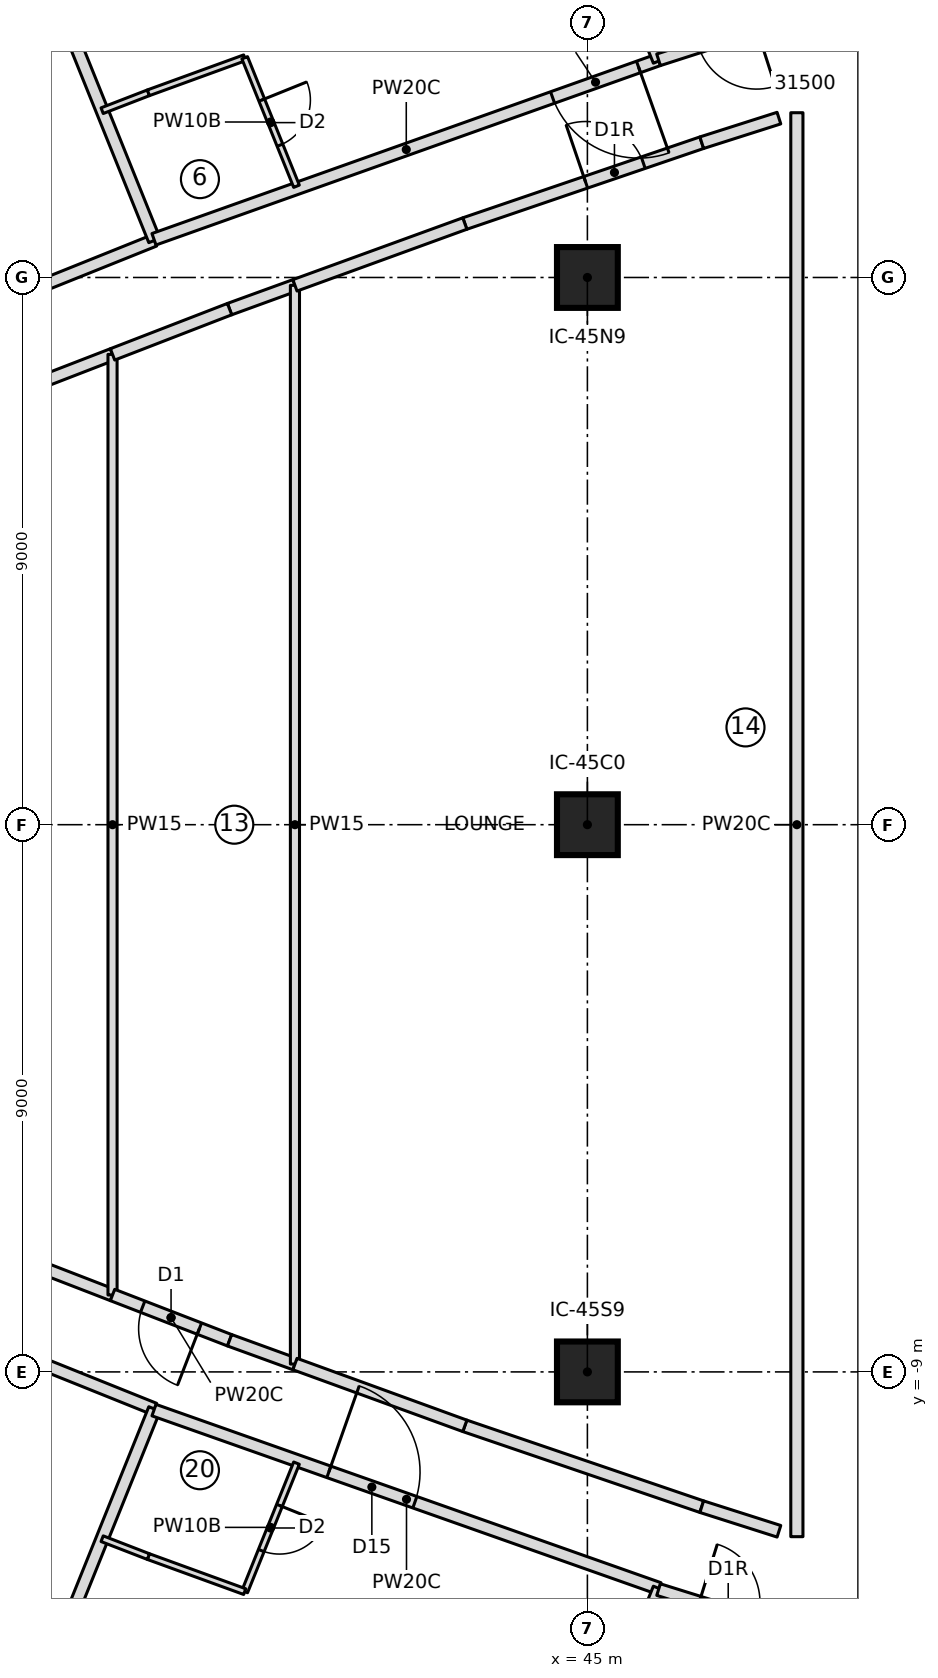
"""IFC4 building model, lengths in metres.
Left out: names, types, materials, properties, quantities, classifications, styles, units other than length and angle.
Written with IfcOpenShell. Run it as: python <this file> out.ifc"""

import sys

from ifc_helpers import new_model, si_unit, direction, frame, frame_2d, origin, origin_2d, place, context, subcontext, project, spatial, rectangle, extrude, element, fill, save


model = new_model("IFC4")
c1 = context("Model", 3, precision=1e-05, world=origin(), true_north=direction((0.0, 1.0)))
c2 = subcontext(c1, "Body", "Model", "MODEL_VIEW")
j1 = project(units=[si_unit("LENGTHUNIT", "METRE"), si_unit("PLANEANGLEUNIT", "RADIAN")], contexts=[c1])
p1 = place(None, origin())
s1 = spatial("IfcSite", under=j1, at=p1, CompositionType="ELEMENT")
p2 = place(p1, origin())
s2 = spatial("IfcBuilding", under=s1, at=p2, CompositionType="ELEMENT")
p3 = place(p2, frame((0.0, 0.0, 193.25)))
s3 = spatial("IfcBuildingStorey", under=s2, at=p3, CompositionType="ELEMENT", Elevation=193.25)
for number, where, z_axis, x_axis in (
    (1, (45.0, -9.0, 0.0), (0.0, 0.0, 1.0), (1.0, 0.0, 0.0)),
    (2, (45.0, 0.0, 0.0), (0.0, 0.0, 1.0), (1.0, 0.0, 0.0)),
    (3, (45.0, 9.0, 0.0), (0.0, 0.0, 1.0), (1.0, 0.0, 0.0)),
):
    element("IfcColumn", number, at=place(p3, frame(where, z_axis=z_axis, x_axis=x_axis)), inside=s3, PredefinedType="COLUMN", context=c2, shape_type="SweptSolid", body=[
        extrude(rectangle(XDim=1.0, YDim=1.0, at=origin_2d()), origin(), (0.0, 0.0, 1.0), 3.55),
    ])
p4 = place(p3, frame((29.714, 6.329, 0.0), z_axis=(0.0, 0.0, 1.0), x_axis=(0.927886226391, 0.372863448026, 0.0)))
e4 = element("IfcWall", 4, at=p4, inside=s3, PredefinedType="PARTITIONING", context=c2, shape_type="SweptSolid", body=[
    extrude(rectangle(XDim=8.8, YDim=0.2, at=frame_2d((4.4, 0.0))), origin(), (0.0, 0.0, 1.0), 3.25),
])
p5 = place(p4, frame((3.25, 0.0, 0.0)))
e5 = element("IfcOpeningElement", 5, at=p5, cuts=e4, PredefinedType="OPENING", context=c2, shape_type="SweptSolid", body=[
    extrude(rectangle(XDim=1.0, YDim=2.1, at=frame_2d((0.5, 1.05))), frame((0.0, 0.11, 0.0), z_axis=(0.0, -1.0, 0.0), x_axis=(1.0, 0.0, 0.0)), (0.0, 0.0, 1.0), 0.22),
])
p6 = place(p3, frame((37.88, 9.61, 0.0), z_axis=(0.0, 0.0, 1.0), x_axis=(-0.373892577014, 0.927472016211, 0.0)))
e6 = element("IfcWall", 6, at=p6, inside=s3, PredefinedType="PARTITIONING", context=c2, shape_type="SweptSolid", body=[
    extrude(rectangle(XDim=7.601, YDim=0.2, at=frame_2d((3.8, 0.0))), origin(), (0.0, 0.0, 1.0), 3.25),
])
p7 = place(p3, frame((46.17, 12.58, 0.0), z_axis=(0.0, 0.0, 1.0), x_axis=(-0.942170738702, -0.335133255786, 0.0)))
e7 = element("IfcWall", 7, at=p7, inside=s3, PredefinedType="PARTITIONING", context=c2, shape_type="SweptSolid", body=[
    extrude(rectangle(XDim=8.807, YDim=0.2, at=frame_2d((4.404, 0.0))), origin(), (0.0, 0.0, 1.0), 3.25),
])
p8 = place(p7, frame((0.35, 0.0, 0.0)))
e8 = element("IfcOpeningElement", 8, at=p8, cuts=e7, PredefinedType="OPENING", context=c2, shape_type="SweptSolid", body=[
    extrude(rectangle(XDim=1.5, YDim=2.1, at=frame_2d((0.75, 1.05))), frame((0.0, 0.11, 0.0), z_axis=(0.0, -1.0, 0.0), x_axis=(1.0, 0.0, 0.0)), (0.0, 0.0, 1.0), 0.22),
])
p9 = place(p3, frame((37.02, 11.743, 0.0), z_axis=(0.0, 0.0, 1.0), x_axis=(0.9326493613, 0.360784102846, 0.0)))
e9 = element("IfcWall", 9, at=p9, inside=s3, PredefinedType="PARTITIONING", context=c2, shape_type="SweptSolid", body=[
    extrude(rectangle(XDim=0.815, YDim=0.1, at=frame_2d((0.408, 0.0))), origin(), (0.0, 0.0, 1.0), 3.25),
])
p10 = place(p3, frame((37.78, 12.037, 0.0), z_axis=(0.0, 0.0, 1.0), x_axis=(0.939759586286, 0.341836101053, 0.0)))
e10 = element("IfcWall", 10, at=p10, inside=s3, PredefinedType="PARTITIONING", context=c2, shape_type="SweptSolid", body=[
    extrude(rectangle(XDim=1.686, YDim=0.1, at=frame_2d((0.843, 0.0))), origin(), (0.0, 0.0, 1.0), 3.25),
])
p11 = place(p3, frame((39.364, 12.614, 0.0), z_axis=(0.0, 0.0, 1.0), x_axis=(0.373883593317, -0.927475637765, 0.0)))
e11 = element("IfcWall", 11, at=p11, inside=s3, PredefinedType="PARTITIONING", context=c2, shape_type="SweptSolid", body=[
    extrude(rectangle(XDim=2.278, YDim=0.1, at=frame_2d((1.139, 0.0))), origin(), (0.0, 0.0, 1.0), 3.25),
])
p12 = place(p11, frame((0.75, 0.0, 0.0)))
e12 = element("IfcOpeningElement", 12, at=p12, cuts=e11, PredefinedType="OPENING", context=c2, shape_type="SweptSolid", body=[
    extrude(rectangle(XDim=0.8, YDim=2.1, at=frame_2d((0.4, 1.05))), frame((0.0, 0.06, 0.0), z_axis=(0.0, -1.0, 0.0), x_axis=(1.0, 0.0, 0.0)), (0.0, 0.0, 1.0), 0.12),
])
p13 = place(p3, frame((46.178, 12.562, 0.0), z_axis=(0.0, 0.0, 1.0), x_axis=(-0.373905590149, 0.927466770108, 0.0)))
e13 = element("IfcWall", 13, at=p13, inside=s3, PredefinedType="PARTITIONING", context=c2, shape_type="SweptSolid", body=[
    extrude(rectangle(XDim=7.611, YDim=0.2, at=frame_2d((3.806, 0.0))), origin(), (0.0, 0.0, 1.0), 3.25),
])
p14 = place(p3, frame((29.714, -6.329, 0.0), z_axis=(0.0, 0.0, 1.0), x_axis=(0.927886226391, -0.372863448026, 0.0)))
e14 = element("IfcWall", 14, at=p14, inside=s3, PredefinedType="PARTITIONING", context=c2, shape_type="SweptSolid", body=[
    extrude(rectangle(XDim=8.8, YDim=0.2, at=frame_2d((4.4, 0.0))), origin(), (0.0, 0.0, 1.0), 3.25),
])
p15 = place(p14, frame((3.25, 0.0, 0.0)))
e15 = element("IfcOpeningElement", 15, at=p15, cuts=e14, PredefinedType="OPENING", context=c2, shape_type="SweptSolid", body=[
    extrude(rectangle(XDim=1.0, YDim=2.1, at=frame_2d((0.5, 1.05))), frame((0.0, 0.11, 0.0), z_axis=(0.0, -1.0, 0.0), x_axis=(1.0, 0.0, 0.0)), (0.0, 0.0, 1.0), 0.22),
])
p16 = place(p3, frame((35.038, -16.659, 0.0), z_axis=(0.0, 0.0, 1.0), x_axis=(0.373892577014, 0.927472016211, 0.0)))
e16 = element("IfcWall", 16, at=p16, inside=s3, PredefinedType="PARTITIONING", context=c2, shape_type="SweptSolid", body=[
    extrude(rectangle(XDim=7.601, YDim=0.2, at=frame_2d((3.8, 0.0))), origin(), (0.0, 0.0, 1.0), 3.25),
])
p17 = place(p3, frame((37.872, -9.628, 0.0), z_axis=(0.0, 0.0, 1.0), x_axis=(0.9429299378, -0.332991189675, 0.0)))
e17 = element("IfcWall", 17, at=p17, inside=s3, PredefinedType="PARTITIONING", context=c2, shape_type="SweptSolid", body=[
    extrude(rectangle(XDim=8.808, YDim=0.2, at=frame_2d((4.404, 0.0))), origin(), (0.0, 0.0, 1.0), 3.25),
])
p18 = place(p17, frame((3.05, 0.0, 0.0)))
e18 = element("IfcOpeningElement", 18, at=p18, cuts=e17, PredefinedType="OPENING", context=c2, shape_type="SweptSolid", body=[
    extrude(rectangle(XDim=1.5, YDim=2.1, at=frame_2d((0.75, 1.05))), frame((0.0, 0.11, 0.0), z_axis=(0.0, -1.0, 0.0), x_axis=(1.0, 0.0, 0.0)), (0.0, 0.0, 1.0), 0.22),
])
p19 = place(p3, frame((40.216, -10.5, 0.0), z_axis=(0.0, 0.0, 1.0), x_axis=(-0.373883593317, -0.927475637765, 0.0)))
e19 = element("IfcWall", 19, at=p19, inside=s3, PredefinedType="PARTITIONING", context=c2, shape_type="SweptSolid", body=[
    extrude(rectangle(XDim=2.278, YDim=0.1, at=frame_2d((1.139, 0.0))), origin(), (0.0, 0.0, 1.0), 3.25),
])
p20 = place(p19, frame((0.75, 0.0, 0.0)))
e20 = element("IfcOpeningElement", 20, at=p20, cuts=e19, PredefinedType="OPENING", context=c2, shape_type="SweptSolid", body=[
    extrude(rectangle(XDim=0.8, YDim=2.1, at=frame_2d((0.4, 1.05))), frame((0.0, 0.06, 0.0), z_axis=(0.0, -1.0, 0.0), x_axis=(1.0, 0.0, 0.0)), (0.0, 0.0, 1.0), 0.12),
])
p21 = place(p3, frame((39.364, -12.614, 0.0), z_axis=(0.0, 0.0, 1.0), x_axis=(-0.939759586286, 0.341836101053, 0.0)))
e21 = element("IfcWall", 21, at=p21, inside=s3, PredefinedType="PARTITIONING", context=c2, shape_type="SweptSolid", body=[
    extrude(rectangle(XDim=1.686, YDim=0.1, at=frame_2d((0.843, 0.0))), origin(), (0.0, 0.0, 1.0), 3.25),
])
p22 = place(p3, frame((37.78, -12.037, 0.0), z_axis=(0.0, 0.0, 1.0), x_axis=(-0.9326493613, 0.360784102846, 0.0)))
e22 = element("IfcWall", 22, at=p22, inside=s3, PredefinedType="PARTITIONING", context=c2, shape_type="SweptSolid", body=[
    extrude(rectangle(XDim=0.815, YDim=0.1, at=frame_2d((0.408, 0.0))), origin(), (0.0, 0.0, 1.0), 3.25),
])
p23 = place(p3, frame((43.332, -19.621, 0.0), z_axis=(0.0, 0.0, 1.0), x_axis=(0.373905590149, 0.927466770108, 0.0)))
e23 = element("IfcWall", 23, at=p23, inside=s3, PredefinedType="PARTITIONING", context=c2, shape_type="SweptSolid", body=[
    extrude(rectangle(XDim=7.611, YDim=0.2, at=frame_2d((3.806, 0.0))), origin(), (0.0, 0.0, 1.0), 3.25),
])
for number, where, z_axis, x_axis in (
    (24, (35.276, 6.994, 0.0), (0.0, 0.0, 1.0), (0.933, 0.361, 0.0)),
    (25, (37.19, -7.735, 0.0), (0.0, 0.0, 1.0), (-0.933, 0.361, 0.0)),
):
    element("IfcWall", number, at=place(p3, frame(where, z_axis=z_axis, x_axis=x_axis)), inside=s3, PredefinedType="PARTITIONING", context=c2, shape_type="SweptSolid", body=[
        extrude(rectangle(XDim=2.053, YDim=0.2, at=frame_2d((1.026, 0.0))), origin(), (0.0, 0.0, 1.0), 3.25),
    ])
p24 = place(p3, frame((37.19, -7.735, 0.0), z_axis=(0.0, 0.0, 1.0), x_axis=(0.0, 1.0, 0.0)))
e26 = element("IfcWall", 26, at=p24, inside=s3, PredefinedType="PARTITIONING", context=c2, shape_type="SweptSolid", body=[
    extrude(rectangle(XDim=15.47, YDim=0.15, at=frame_2d((7.735, 0.0))), origin(), (0.0, 0.0, 1.0), 3.25),
])
p25 = place(p3, frame((39.115, -8.479, 0.0), z_axis=(0.0, 0.0, 1.0), x_axis=(-0.9326579855, 0.360761807961, 0.0)))
e27 = element("IfcWall", 27, at=p25, inside=s3, PredefinedType="PARTITIONING", context=c2, shape_type="SweptSolid", body=[
    extrude(rectangle(XDim=2.064, YDim=0.2, at=frame_2d((1.032, 0.0))), origin(), (0.0, 0.0, 1.0), 3.25),
])
p26 = place(p25, frame((0.532, 0.0, 0.0)))
e28 = element("IfcOpeningElement", 28, at=p26, cuts=e27, PredefinedType="OPENING", context=c2, shape_type="SweptSolid", body=[
    extrude(rectangle(XDim=1.0, YDim=2.1, at=frame_2d((0.5, 1.05))), frame((0.0, 0.11, 0.0), z_axis=(0.0, -1.0, 0.0), x_axis=(1.0, 0.0, 0.0)), (0.0, 0.0, 1.0), 0.22),
])
for number, where, z_axis, x_axis in (
    (29, (39.115, 8.479, 0.0), (0.0, 0.0, 1.0), (0.94, 0.342, 0.0)),
    (30, (40.19, -8.871, 0.0), (0.0, 0.0, 1.0), (-0.94, 0.342, 0.0)),
):
    element("IfcWall", number, at=place(p3, frame(where, z_axis=z_axis, x_axis=x_axis)), inside=s3, PredefinedType="PARTITIONING", context=c2, shape_type="SweptSolid", body=[
        extrude(rectangle(XDim=1.144, YDim=0.2, at=frame_2d((0.572, 0.0))), origin(), (0.0, 0.0, 1.0), 3.25),
    ])
p27 = place(p3, frame((37.19, 7.735, 0.0), z_axis=(0.0, 0.0, 1.0), x_axis=(0.9326579855, 0.360761807961, 0.0)))
e31 = element("IfcWall", 31, at=p27, inside=s3, PredefinedType="PARTITIONING", context=c2, shape_type="SweptSolid", body=[
    extrude(rectangle(XDim=2.064, YDim=0.2, at=frame_2d((1.032, 0.0))), origin(), (0.0, 0.0, 1.0), 3.25),
])
p28 = place(p3, frame((40.19, -8.871, 0.0), z_axis=(0.0, 0.0, 1.0), x_axis=(0.0, 1.0, 0.0)))
e32 = element("IfcWall", 32, at=p28, inside=s3, PredefinedType="PARTITIONING", context=c2, shape_type="SweptSolid", body=[
    extrude(rectangle(XDim=17.741, YDim=0.15, at=frame_2d((8.871, 0.0))), origin(), (0.0, 0.0, 1.0), 3.25),
])
p29 = place(p3, frame((42.984, 9.887, 0.0), z_axis=(0.0, 0.0, 1.0), x_axis=(0.946436071896, 0.322891253852, 0.0)))
e33 = element("IfcWall", 33, at=p29, inside=s3, PredefinedType="PARTITIONING", context=c2, shape_type="SweptSolid", body=[
    extrude(rectangle(XDim=4.117, YDim=0.2, at=frame_2d((2.059, 0.0))), origin(), (0.0, 0.0, 1.0), 3.25),
])
p30 = place(p29, frame((2.1, 0.0, 0.0)))
e34 = element("IfcOpeningElement", 34, at=p30, cuts=e33, PredefinedType="OPENING", context=c2, shape_type="SweptSolid", body=[
    extrude(rectangle(XDim=1.0, YDim=2.1, at=frame_2d((0.5, 1.05))), frame((0.0, 0.11, 0.0), z_axis=(0.0, -1.0, 0.0), x_axis=(1.0, 0.0, 0.0)), (0.0, 0.0, 1.0), 0.22),
])
p31 = place(p3, frame((46.881, -11.217, 0.0), z_axis=(0.0, 0.0, 1.0), x_axis=(-0.946436071896, 0.322891253852, 0.0)))
e35 = element("IfcWall", 35, at=p31, inside=s3, PredefinedType="PARTITIONING", context=c2, shape_type="SweptSolid", body=[
    extrude(rectangle(XDim=4.117, YDim=0.2, at=frame_2d((2.059, 0.0))), origin(), (0.0, 0.0, 1.0), 3.25),
])
for number, where, z_axis, x_axis in (
    (36, (42.984, -9.887, 0.0), (0.0, 0.0, 1.0), (-0.94, 0.342, 0.0)),
    (37, (40.19, 8.871, 0.0), (0.0, 0.0, 1.0), (0.94, 0.342, 0.0)),
):
    element("IfcWall", number, at=place(p3, frame(where, z_axis=z_axis, x_axis=x_axis)), inside=s3, PredefinedType="PARTITIONING", context=c2, shape_type="SweptSolid", body=[
        extrude(rectangle(XDim=2.973, YDim=0.2, at=frame_2d((1.487, 0.0))), origin(), (0.0, 0.0, 1.0), 3.25),
    ])
p32 = place(p3, frame((48.15, 13.216, 0.0), z_axis=(0.0, 0.0, 1.0), x_axis=(-0.952101841283, -0.305781104428, 0.0)))
e38 = element("IfcWall", 38, at=p32, inside=s3, PredefinedType="PARTITIONING", context=c2, shape_type="SweptSolid", body=[
    extrude(rectangle(XDim=2.079, YDim=0.2, at=frame_2d((1.04, 0.0))), origin(), (0.0, 0.0, 1.0), 3.25),
])
p33 = place(p32, frame((0.385, 0.0, 0.0)))
e39 = element("IfcOpeningElement", 39, at=p33, cuts=e38, PredefinedType="OPENING", context=c2, shape_type="SweptSolid", body=[
    extrude(rectangle(XDim=1.0, YDim=2.1, at=frame_2d((0.5, 1.05))), frame((0.0, 0.11, 0.0), z_axis=(0.0, -1.0, 0.0), x_axis=(1.0, 0.0, 0.0)), (0.0, 0.0, 1.0), 0.22),
])
p34 = place(p3, frame((46.17, -12.58, 0.0), z_axis=(0.0, 0.0, 1.0), x_axis=(0.954639063921, -0.297765440634, 0.0)))
e40 = element("IfcWall", 40, at=p34, inside=s3, PredefinedType="PARTITIONING", context=c2, shape_type="SweptSolid", body=[
    extrude(rectangle(XDim=2.073, YDim=0.2, at=frame_2d((1.037, 0.0))), origin(), (0.0, 0.0, 1.0), 3.25),
])
p35 = place(p34, frame((0.7, 0.0, 0.0)))
e41 = element("IfcOpeningElement", 41, at=p35, cuts=e40, PredefinedType="OPENING", context=c2, shape_type="SweptSolid", body=[
    extrude(rectangle(XDim=1.0, YDim=2.1, at=frame_2d((0.5, 1.05))), frame((0.0, 0.11, 0.0), z_axis=(0.0, -1.0, 0.0), x_axis=(1.0, 0.0, 0.0)), (0.0, 0.0, 1.0), 0.22),
])
for number, where, z_axis, x_axis in (
    (42, (46.881, 11.217, 0.0), (0.0, 0.0, 1.0), (0.953, 0.304, 0.0)),
    (43, (48.15, -11.621, 0.0), (0.0, 0.0, 1.0), (-0.953, 0.304, 0.0)),
):
    element("IfcWall", number, at=place(p3, frame(where, z_axis=z_axis, x_axis=x_axis)), inside=s3, PredefinedType="PARTITIONING", context=c2, shape_type="SweptSolid", body=[
        extrude(rectangle(XDim=1.332, YDim=0.2, at=frame_2d((0.666, 0.0))), origin(), (0.0, 0.0, 1.0), 3.25),
    ])
p36 = place(p3, frame((48.445, 11.71, 0.0), z_axis=(0.0, 0.0, 1.0), x_axis=(0.0, -1.0, 0.0)))
e44 = element("IfcWall", 44, at=p36, inside=s3, PredefinedType="PARTITIONING", context=c2, shape_type="SweptSolid", body=[
    extrude(rectangle(XDim=23.42, YDim=0.2, at=frame_2d((11.71, 0.0))), origin(), (0.0, 0.0, 1.0), 3.25),
])
p37 = place(p12, origin())
e45 = element("IfcDoor", 45, at=p37, inside=s3, OperationType="SINGLE_SWING_LEFT", PredefinedType="DOOR", context=c2, shape_type="SweptSolid", body=[
    extrude(rectangle(XDim=0.8, YDim=2.1, at=frame_2d((0.4, 1.05))), frame((0.0, 0.025, 0.0), z_axis=(0.0, -1.0, 0.0), x_axis=(1.0, 0.0, 0.0)), (0.0, 0.0, 1.0), 0.05),
])
fill(e12, e45)
p38 = place(p8, origin())
e46 = element("IfcDoor", 46, at=p38, inside=s3, OperationType="DOUBLE_DOOR_SINGLE_SWING", PredefinedType="DOOR", context=c2, shape_type="SweptSolid", body=[
    extrude(rectangle(XDim=1.5, YDim=2.1, at=frame_2d((0.75, 1.05))), frame((0.0, 0.025, 0.0), z_axis=(0.0, -1.0, 0.0), x_axis=(1.0, 0.0, 0.0)), (0.0, 0.0, 1.0), 0.05),
])
fill(e8, e46)
p39 = place(p20, origin())
e47 = element("IfcDoor", 47, at=p39, inside=s3, OperationType="SINGLE_SWING_LEFT", PredefinedType="DOOR", context=c2, shape_type="SweptSolid", body=[
    extrude(rectangle(XDim=0.8, YDim=2.1, at=frame_2d((0.4, 1.05))), frame((0.0, 0.025, 0.0), z_axis=(0.0, -1.0, 0.0), x_axis=(1.0, 0.0, 0.0)), (0.0, 0.0, 1.0), 0.05),
])
fill(e20, e47)
p40 = place(p18, origin())
e48 = element("IfcDoor", 48, at=p40, inside=s3, OperationType="DOUBLE_DOOR_SINGLE_SWING", PredefinedType="DOOR", context=c2, shape_type="SweptSolid", body=[
    extrude(rectangle(XDim=1.5, YDim=2.1, at=frame_2d((0.75, 1.05))), frame((0.0, 0.025, 0.0), z_axis=(0.0, -1.0, 0.0), x_axis=(1.0, 0.0, 0.0)), (0.0, 0.0, 1.0), 0.05),
])
fill(e18, e48)
p41 = place(p26, origin())
e49 = element("IfcDoor", 49, at=p41, inside=s3, OperationType="SINGLE_SWING_LEFT", PredefinedType="DOOR", context=c2, shape_type="SweptSolid", body=[
    extrude(rectangle(XDim=1.0, YDim=2.1, at=frame_2d((0.5, 1.05))), frame((0.0, 0.025, 0.0), z_axis=(0.0, -1.0, 0.0), x_axis=(1.0, 0.0, 0.0)), (0.0, 0.0, 1.0), 0.05),
])
fill(e28, e49)
p42 = place(p30, origin())
e50 = element("IfcDoor", 50, at=p42, inside=s3, OperationType="SINGLE_SWING_RIGHT", PredefinedType="DOOR", context=c2, shape_type="SweptSolid", body=[
    extrude(rectangle(XDim=1.0, YDim=2.1, at=frame_2d((0.5, 1.05))), frame((0.0, 0.025, 0.0), z_axis=(0.0, -1.0, 0.0), x_axis=(1.0, 0.0, 0.0)), (0.0, 0.0, 1.0), 0.05),
])
fill(e34, e50)
save(model, sys.argv[1])
